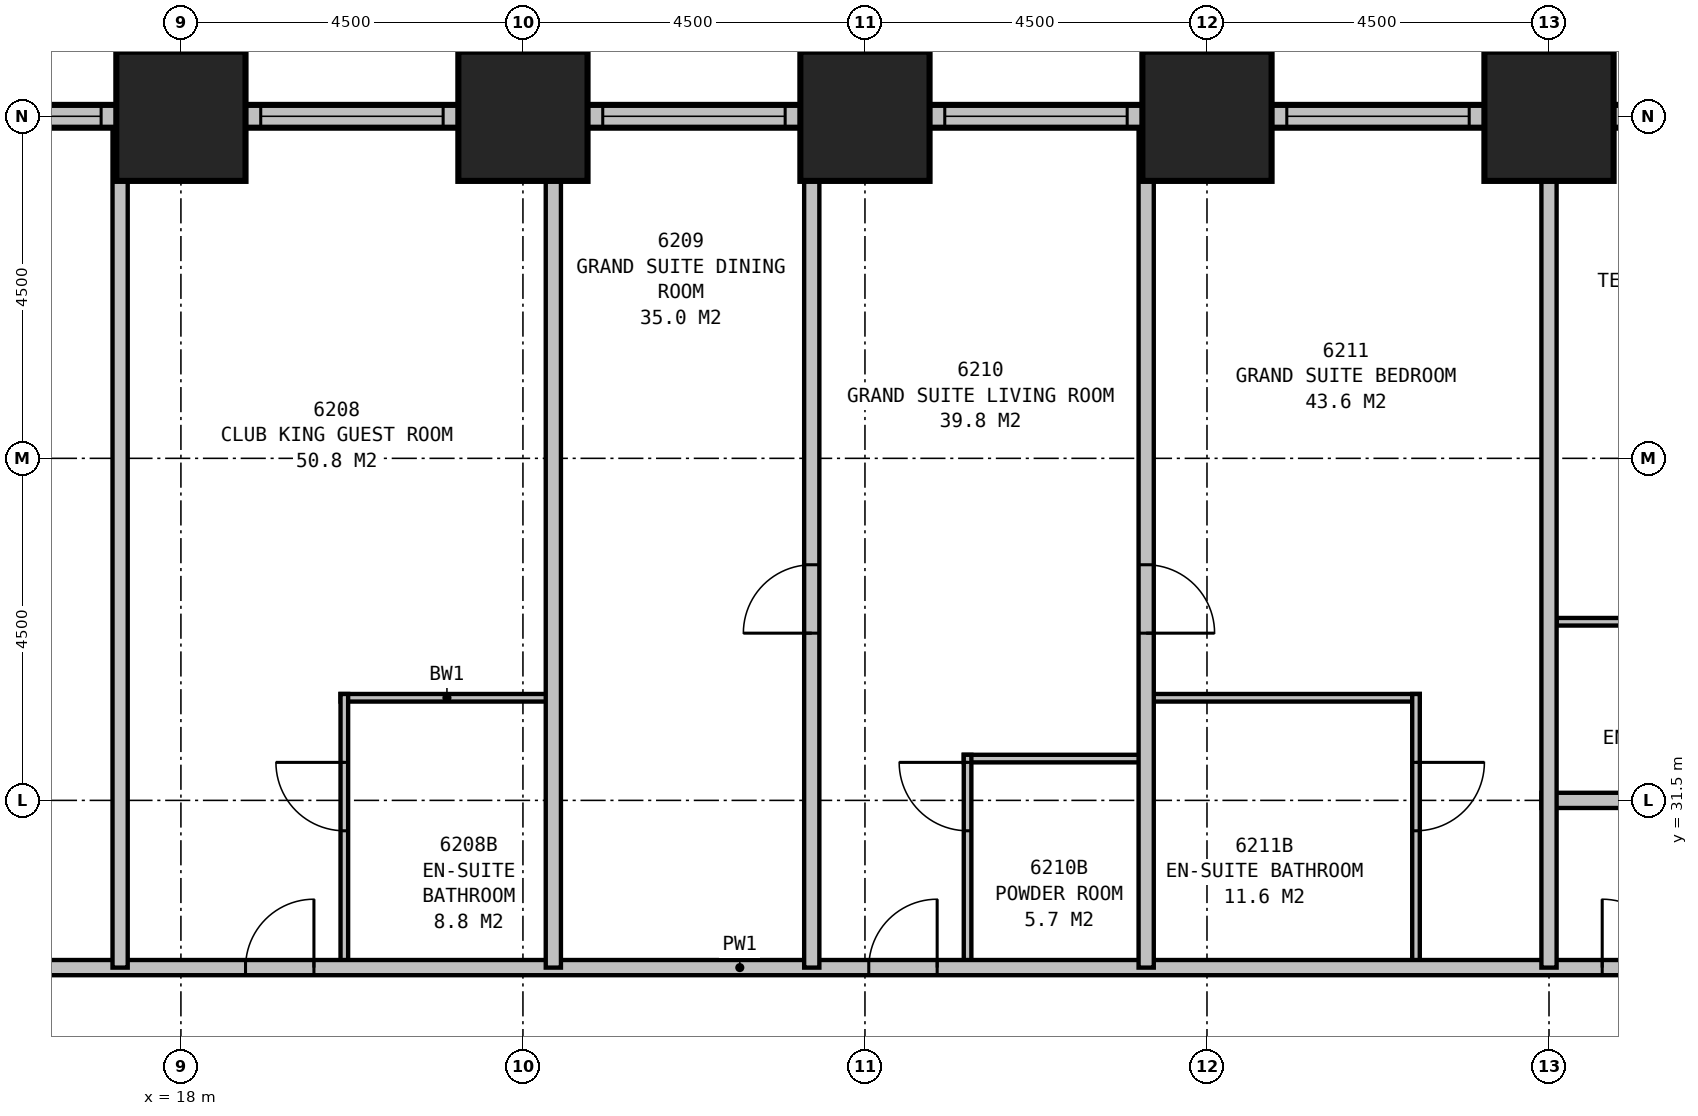
"""IFC4 building model, lengths in metres.
Left out: names, types, materials, properties, quantities, classifications, styles, units other than length and angle.
Written with IfcOpenShell. Run it as: python <this file> out.ifc"""

import sys

from ifc_helpers import new_model, si_unit, direction, frame, frame_2d, origin, origin_2d, place, context, subcontext, project, spatial, rectangle, extrude, element, fill, save


model = new_model("IFC4")
c1 = context("Model", 3, precision=1e-05, world=origin(), true_north=direction((0.0, 1.0)))
c2 = subcontext(c1, "Body", "Model", "MODEL_VIEW")
j1 = project(units=[si_unit("LENGTHUNIT", "METRE"), si_unit("PLANEANGLEUNIT", "RADIAN")], contexts=[c1])
p1 = place(None, origin())
s1 = spatial("IfcSite", under=j1, at=p1, CompositionType="ELEMENT")
p2 = place(p1, origin())
s2 = spatial("IfcBuilding", under=s1, at=p2, CompositionType="ELEMENT")
p3 = place(p2, frame((0.0, 0.0, 240.8)))
s3 = spatial("IfcBuildingStorey", under=s2, at=p3, CompositionType="ELEMENT", Elevation=240.8)
for number, where, z_axis, x_axis in (
    (1, (36.0, 40.5, 0.0), (0.0, 0.0, 1.0), (1.0, 0.0, 0.0)),
    (2, (31.5, 40.5, 0.0), (0.0, 0.0, 1.0), (1.0, 0.0, 0.0)),
    (3, (27.0, 40.5, 0.0), (0.0, 0.0, 1.0), (1.0, 0.0, 0.0)),
    (4, (22.5, 40.5, 0.0), (0.0, 0.0, 1.0), (1.0, 0.0, 0.0)),
    (5, (18.0, 40.5, 0.0), (0.0, 0.0, 1.0), (1.0, 0.0, 0.0)),
):
    element("IfcColumn", number, at=place(p3, frame(where, z_axis=z_axis, x_axis=x_axis)), inside=s3, PredefinedType="COLUMN", context=c2, shape_type="SweptSolid", body=[
        extrude(rectangle(XDim=1.7, YDim=1.7, at=origin_2d()), origin(), (0.0, 0.0, 1.0), 3.9),
    ])
p4 = place(p3, frame((40.65, 40.5, 0.0), z_axis=(0.0, 0.0, 1.0), x_axis=(-1.0, 0.0, 0.0)))
e6 = element("IfcWall", 6, at=p4, inside=s3, PredefinedType="STANDARD", context=c2, shape_type="SweptSolid", body=[
    extrude(rectangle(XDim=27.3, YDim=0.3, at=frame_2d((13.65, 0.0))), origin(), (0.0, 0.0, 1.0), 2.45),
])
p5 = place(p4, frame((1.2, 0.0, 0.5)))
e7 = element("IfcOpeningElement", 7, at=p5, cuts=e6, PredefinedType="OPENING", context=c2, shape_type="SweptSolid", body=[
    extrude(rectangle(XDim=2.4, YDim=1.75, at=frame_2d((1.2, 0.875))), frame((0.0, 0.16, 0.0), z_axis=(0.0, -1.0, 0.0), x_axis=(1.0, 0.0, 0.0)), (0.0, 0.0, 1.0), 0.32),
])
p6 = place(p4, frame((5.7, 0.0, 0.5)))
e8 = element("IfcOpeningElement", 8, at=p6, cuts=e6, PredefinedType="OPENING", context=c2, shape_type="SweptSolid", body=[
    extrude(rectangle(XDim=2.4, YDim=1.75, at=frame_2d((1.2, 0.875))), frame((0.0, 0.16, 0.0), z_axis=(0.0, -1.0, 0.0), x_axis=(1.0, 0.0, 0.0)), (0.0, 0.0, 1.0), 0.32),
])
p7 = place(p4, frame((10.2, 0.0, 0.5)))
e9 = element("IfcOpeningElement", 9, at=p7, cuts=e6, PredefinedType="OPENING", context=c2, shape_type="SweptSolid", body=[
    extrude(rectangle(XDim=2.4, YDim=1.75, at=frame_2d((1.2, 0.875))), frame((0.0, 0.16, 0.0), z_axis=(0.0, -1.0, 0.0), x_axis=(1.0, 0.0, 0.0)), (0.0, 0.0, 1.0), 0.32),
])
p8 = place(p4, frame((14.7, 0.0, 0.5)))
e10 = element("IfcOpeningElement", 10, at=p8, cuts=e6, PredefinedType="OPENING", context=c2, shape_type="SweptSolid", body=[
    extrude(rectangle(XDim=2.4, YDim=1.75, at=frame_2d((1.2, 0.875))), frame((0.0, 0.16, 0.0), z_axis=(0.0, -1.0, 0.0), x_axis=(1.0, 0.0, 0.0)), (0.0, 0.0, 1.0), 0.32),
])
p9 = place(p4, frame((19.2, 0.0, 0.5)))
e11 = element("IfcOpeningElement", 11, at=p9, cuts=e6, PredefinedType="OPENING", context=c2, shape_type="SweptSolid", body=[
    extrude(rectangle(XDim=2.4, YDim=1.75, at=frame_2d((1.2, 0.875))), frame((0.0, 0.16, 0.0), z_axis=(0.0, -1.0, 0.0), x_axis=(1.0, 0.0, 0.0)), (0.0, 0.0, 1.0), 0.32),
])
p10 = place(p4, frame((23.7, 0.0, 0.5)))
e12 = element("IfcOpeningElement", 12, at=p10, cuts=e6, PredefinedType="OPENING", context=c2, shape_type="SweptSolid", body=[
    extrude(rectangle(XDim=2.4, YDim=1.75, at=frame_2d((1.2, 0.875))), frame((0.0, 0.16, 0.0), z_axis=(0.0, -1.0, 0.0), x_axis=(1.0, 0.0, 0.0)), (0.0, 0.0, 1.0), 0.32),
])
p11 = place(p3, frame((12.406, 29.3, 0.0), z_axis=(0.0, 0.0, 1.0), x_axis=(1.0, 0.0, 0.0)))
e13 = element("IfcWall", 13, at=p11, inside=s3, PredefinedType="PARTITIONING", context=c2, shape_type="SweptSolid", body=[
    extrude(rectangle(XDim=25.894, YDim=0.2, at=frame_2d((12.947, 0.0))), origin(), (0.0, 0.0, 1.0), 3.65),
])
p12 = place(p11, frame((0.9, 0.0, 0.0)))
e14 = element("IfcOpeningElement", 14, at=p12, cuts=e13, PredefinedType="OPENING", context=c2, shape_type="SweptSolid", body=[
    extrude(rectangle(XDim=0.9, YDim=2.1, at=frame_2d((0.45, 1.05))), frame((0.0, 0.11, 0.0), z_axis=(0.0, -1.0, 0.0), x_axis=(1.0, 0.0, 0.0)), (0.0, 0.0, 1.0), 0.22),
])
p13 = place(p11, frame((6.444, 0.0, 0.0)))
e15 = element("IfcOpeningElement", 15, at=p13, cuts=e13, PredefinedType="OPENING", context=c2, shape_type="SweptSolid", body=[
    extrude(rectangle(XDim=0.9, YDim=2.1, at=frame_2d((0.45, 1.05))), frame((0.0, 0.11, 0.0), z_axis=(0.0, -1.0, 0.0), x_axis=(1.0, 0.0, 0.0)), (0.0, 0.0, 1.0), 0.22),
])
p14 = place(p11, frame((14.644, 0.0, 0.0)))
e16 = element("IfcOpeningElement", 16, at=p14, cuts=e13, PredefinedType="OPENING", context=c2, shape_type="SweptSolid", body=[
    extrude(rectangle(XDim=0.9, YDim=2.1, at=frame_2d((0.45, 1.05))), frame((0.0, 0.11, 0.0), z_axis=(0.0, -1.0, 0.0), x_axis=(1.0, 0.0, 0.0)), (0.0, 0.0, 1.0), 0.22),
])
p15 = place(p11, frame((24.293, 0.0, 0.0)))
e17 = element("IfcOpeningElement", 17, at=p15, cuts=e13, PredefinedType="OPENING", context=c2, shape_type="SweptSolid", body=[
    extrude(rectangle(XDim=0.9, YDim=2.1, at=frame_2d((0.45, 1.05))), frame((0.0, 0.11, 0.0), z_axis=(0.0, -1.0, 0.0), x_axis=(1.0, 0.0, 0.0)), (0.0, 0.0, 1.0), 0.22),
])
for number, where, z_axis, x_axis in (
    (18, (17.2, 29.3, 0.0), (0.0, 0.0, 1.0), (0.0, 1.0, 0.0)),
    (19, (22.9, 29.3, 0.0), (0.0, 0.0, 1.0), (0.0, 1.0, 0.0)),
):
    element("IfcWall", number, at=place(p3, frame(where, z_axis=z_axis, x_axis=x_axis)), inside=s3, PredefinedType="PARTITIONING", context=c2, shape_type="SweptSolid", body=[
        extrude(rectangle(XDim=11.2, YDim=0.2, at=frame_2d((5.6, 0.0))), origin(), (0.0, 0.0, 1.0), 2.6),
    ])
p16 = place(p3, frame((26.3, 29.3, 0.0), z_axis=(0.0, 0.0, 1.0), x_axis=(0.0, 1.0, 0.0)))
e20 = element("IfcWall", 20, at=p16, inside=s3, PredefinedType="PARTITIONING", context=c2, shape_type="SweptSolid", body=[
    extrude(rectangle(XDim=11.2, YDim=0.2, at=frame_2d((5.6, 0.0))), origin(), (0.0, 0.0, 1.0), 2.6),
])
p17 = place(p16, frame((4.4, 0.0, 0.0)))
e21 = element("IfcOpeningElement", 21, at=p17, cuts=e20, PredefinedType="OPENING", context=c2, shape_type="SweptSolid", body=[
    extrude(rectangle(XDim=0.9, YDim=2.1, at=frame_2d((0.45, 1.05))), frame((0.0, 0.11, 0.0), z_axis=(0.0, -1.0, 0.0), x_axis=(1.0, 0.0, 0.0)), (0.0, 0.0, 1.0), 0.22),
])
p18 = place(p3, frame((30.7, 29.3, 0.0), z_axis=(0.0, 0.0, 1.0), x_axis=(0.0, 1.0, 0.0)))
e22 = element("IfcWall", 22, at=p18, inside=s3, PredefinedType="PARTITIONING", context=c2, shape_type="SweptSolid", body=[
    extrude(rectangle(XDim=11.2, YDim=0.2, at=frame_2d((5.6, 0.0))), origin(), (0.0, 0.0, 1.0), 2.6),
])
p19 = place(p18, frame((5.3, 0.0, 0.0), z_axis=(0.0, 0.0, 1.0), x_axis=(-1.0, 0.0, 0.0)))
e23 = element("IfcOpeningElement", 23, at=p19, cuts=e22, PredefinedType="OPENING", context=c2, shape_type="SweptSolid", body=[
    extrude(rectangle(XDim=0.9, YDim=2.1, at=frame_2d((0.45, 1.05))), frame((0.0, 0.11, 0.0), z_axis=(0.0, -1.0, 0.0), x_axis=(1.0, 0.0, 0.0)), (0.0, 0.0, 1.0), 0.22),
])
p20 = place(p3, frame((20.1, 32.85, 0.0), z_axis=(0.0, 0.0, 1.0), x_axis=(1.0, 0.0, 0.0)))
e24 = element("IfcWall", 24, at=p20, inside=s3, PredefinedType="PLUMBINGWALL", context=c2, shape_type="SweptSolid", body=[
    extrude(rectangle(XDim=2.8, YDim=0.1, at=frame_2d((1.4, 0.0))), origin(), (0.0, 0.0, 1.0), 3.65),
])
p21 = place(p3, frame((20.15, 29.3, 0.0), z_axis=(0.0, 0.0, 1.0), x_axis=(0.0, 1.0, 0.0)))
e25 = element("IfcWall", 25, at=p21, inside=s3, PredefinedType="PLUMBINGWALL", context=c2, shape_type="SweptSolid", body=[
    extrude(rectangle(XDim=3.6, YDim=0.1, at=frame_2d((1.8, 0.0))), origin(), (0.0, 0.0, 1.0), 3.65),
])
p22 = place(p21, frame((1.8, 0.0, 0.0)))
e26 = element("IfcOpeningElement", 26, at=p22, cuts=e25, PredefinedType="OPENING", context=c2, shape_type="SweptSolid", body=[
    extrude(rectangle(XDim=0.9, YDim=2.1, at=frame_2d((0.45, 1.05))), frame((0.0, 0.06, 0.0), z_axis=(0.0, -1.0, 0.0), x_axis=(1.0, 0.0, 0.0)), (0.0, 0.0, 1.0), 0.12),
])
p23 = place(p3, frame((28.3, 32.05, 0.0), z_axis=(0.0, 0.0, 1.0), x_axis=(1.0, 0.0, 0.0)))
e27 = element("IfcWall", 27, at=p23, inside=s3, PredefinedType="PLUMBINGWALL", context=c2, shape_type="SweptSolid", body=[
    extrude(rectangle(XDim=2.4, YDim=0.1, at=frame_2d((1.2, 0.0))), origin(), (0.0, 0.0, 1.0), 3.65),
])
p24 = place(p3, frame((28.35, 29.3, 0.0), z_axis=(0.0, 0.0, 1.0), x_axis=(0.0, 1.0, 0.0)))
e28 = element("IfcWall", 28, at=p24, inside=s3, PredefinedType="PLUMBINGWALL", context=c2, shape_type="SweptSolid", body=[
    extrude(rectangle(XDim=2.8, YDim=0.1, at=frame_2d((1.4, 0.0))), origin(), (0.0, 0.0, 1.0), 3.65),
])
p25 = place(p24, frame((1.8, 0.0, 0.0)))
e29 = element("IfcOpeningElement", 29, at=p25, cuts=e28, PredefinedType="OPENING", context=c2, shape_type="SweptSolid", body=[
    extrude(rectangle(XDim=0.9, YDim=2.1, at=frame_2d((0.45, 1.05))), frame((0.0, 0.06, 0.0), z_axis=(0.0, -1.0, 0.0), x_axis=(1.0, 0.0, 0.0)), (0.0, 0.0, 1.0), 0.12),
])
p26 = place(p3, frame((30.7, 32.85, 0.0), z_axis=(0.0, 0.0, 1.0), x_axis=(1.0, 0.0, 0.0)))
e30 = element("IfcWall", 30, at=p26, inside=s3, PredefinedType="PLUMBINGWALL", context=c2, shape_type="SweptSolid", body=[
    extrude(rectangle(XDim=3.6, YDim=0.1, at=frame_2d((1.8, 0.0))), origin(), (0.0, 0.0, 1.0), 3.65),
])
p27 = place(p3, frame((34.25, 29.3, 0.0), z_axis=(0.0, 0.0, 1.0), x_axis=(0.0, 1.0, 0.0)))
e31 = element("IfcWall", 31, at=p27, inside=s3, PredefinedType="PLUMBINGWALL", context=c2, shape_type="SweptSolid", body=[
    extrude(rectangle(XDim=3.6, YDim=0.1, at=frame_2d((1.8, 0.0))), origin(), (0.0, 0.0, 1.0), 3.65),
])
p28 = place(p27, frame((2.7, 0.0, 0.0), z_axis=(0.0, 0.0, 1.0), x_axis=(-1.0, 0.0, 0.0)))
e32 = element("IfcOpeningElement", 32, at=p28, cuts=e31, PredefinedType="OPENING", context=c2, shape_type="SweptSolid", body=[
    extrude(rectangle(XDim=0.9, YDim=2.1, at=frame_2d((0.45, 1.05))), frame((0.0, 0.06, 0.0), z_axis=(0.0, -1.0, 0.0), x_axis=(1.0, 0.0, 0.0)), (0.0, 0.0, 1.0), 0.12),
])
p29 = place(p3, frame((36.0, 29.3, 0.0), z_axis=(0.0, 0.0, 1.0), x_axis=(0.0, 1.0, 0.0)))
e33 = element("IfcWall", 33, at=p29, inside=s3, PredefinedType="PARTITIONING", context=c2, shape_type="SweptSolid", body=[
    extrude(rectangle(XDim=11.2, YDim=0.2, at=frame_2d((5.6, 0.0))), origin(), (0.0, 0.0, 1.0), 2.6),
])
p30 = place(p3, frame((35.9, 31.5, 0.0), z_axis=(0.0, 0.0, 1.0), x_axis=(1.0, 0.0, 0.0)))
e34 = element("IfcWall", 34, at=p30, inside=s3, PredefinedType="PARTITIONING", context=c2, shape_type="SweptSolid", body=[
    extrude(rectangle(XDim=10.099, YDim=0.2, at=frame_2d((5.05, 0.0))), origin(), (0.0, 0.0, 1.0), 3.65),
])
p31 = place(p30, frame((8.099, 0.0, 0.0)))
e35 = element("IfcOpeningElement", 35, at=p31, cuts=e34, PredefinedType="OPENING", context=c2, shape_type="SweptSolid", body=[
    extrude(rectangle(XDim=0.9, YDim=2.1, at=frame_2d((0.45, 1.05))), frame((0.0, 0.11, 0.0), z_axis=(0.0, -1.0, 0.0), x_axis=(1.0, 0.0, 0.0)), (0.0, 0.0, 1.0), 0.22),
])
p32 = place(p3, frame((36.1, 33.85, 0.0), z_axis=(0.0, 0.0, 1.0), x_axis=(1.0, 0.0, 0.0)))
e36 = element("IfcWall", 36, at=p32, inside=s3, PredefinedType="PLUMBINGWALL", context=c2, shape_type="SweptSolid", body=[
    extrude(rectangle(XDim=3.5, YDim=0.1, at=frame_2d((1.75, 0.0))), origin(), (0.0, 0.0, 1.0), 3.65),
])
p33 = place(p32, frame((0.9, 0.0, 0.0)))
e37 = element("IfcOpeningElement", 37, at=p33, cuts=e36, PredefinedType="OPENING", context=c2, shape_type="SweptSolid", body=[
    extrude(rectangle(XDim=0.9, YDim=2.1, at=frame_2d((0.45, 1.05))), frame((0.0, 0.06, 0.0), z_axis=(0.0, -1.0, 0.0), x_axis=(1.0, 0.0, 0.0)), (0.0, 0.0, 1.0), 0.12),
])
p34 = place(p6, origin())
e38 = element("IfcWindow", 38, at=p34, inside=s3, PartitioningType="SINGLE_PANEL", PredefinedType="WINDOW", context=c2, shape_type="SweptSolid", body=[
    extrude(rectangle(XDim=2.4, YDim=1.75, at=frame_2d((1.2, 0.875))), frame((0.0, 0.03, 0.0), z_axis=(0.0, -1.0, 0.0), x_axis=(1.0, 0.0, 0.0)), (0.0, 0.0, 1.0), 0.06),
])
fill(e8, e38)
p35 = place(p7, origin())
e39 = element("IfcWindow", 39, at=p35, inside=s3, PartitioningType="SINGLE_PANEL", PredefinedType="WINDOW", context=c2, shape_type="SweptSolid", body=[
    extrude(rectangle(XDim=2.4, YDim=1.75, at=frame_2d((1.2, 0.875))), frame((0.0, 0.03, 0.0), z_axis=(0.0, -1.0, 0.0), x_axis=(1.0, 0.0, 0.0)), (0.0, 0.0, 1.0), 0.06),
])
fill(e9, e39)
p36 = place(p8, origin())
e40 = element("IfcWindow", 40, at=p36, inside=s3, PartitioningType="SINGLE_PANEL", PredefinedType="WINDOW", context=c2, shape_type="SweptSolid", body=[
    extrude(rectangle(XDim=2.4, YDim=1.75, at=frame_2d((1.2, 0.875))), frame((0.0, 0.03, 0.0), z_axis=(0.0, -1.0, 0.0), x_axis=(1.0, 0.0, 0.0)), (0.0, 0.0, 1.0), 0.06),
])
fill(e10, e40)
p37 = place(p9, origin())
e41 = element("IfcWindow", 41, at=p37, inside=s3, PartitioningType="SINGLE_PANEL", PredefinedType="WINDOW", context=c2, shape_type="SweptSolid", body=[
    extrude(rectangle(XDim=2.4, YDim=1.75, at=frame_2d((1.2, 0.875))), frame((0.0, 0.03, 0.0), z_axis=(0.0, -1.0, 0.0), x_axis=(1.0, 0.0, 0.0)), (0.0, 0.0, 1.0), 0.06),
])
fill(e11, e41)
p38 = place(p10, origin())
e42 = element("IfcWindow", 42, at=p38, inside=s3, PartitioningType="SINGLE_PANEL", PredefinedType="WINDOW", context=c2, shape_type="SweptSolid", body=[
    extrude(rectangle(XDim=2.4, YDim=1.75, at=frame_2d((1.2, 0.875))), frame((0.0, 0.03, 0.0), z_axis=(0.0, -1.0, 0.0), x_axis=(1.0, 0.0, 0.0)), (0.0, 0.0, 1.0), 0.06),
])
fill(e12, e42)
p39 = place(p13, origin())
e43 = element("IfcDoor", 43, at=p39, inside=s3, OperationType="SINGLE_SWING_RIGHT", PredefinedType="DOOR", context=c2, shape_type="SweptSolid", body=[
    extrude(rectangle(XDim=0.9, YDim=2.1, at=frame_2d((0.45, 1.05))), frame((0.0, 0.025, 0.0), z_axis=(0.0, -1.0, 0.0), x_axis=(1.0, 0.0, 0.0)), (0.0, 0.0, 1.0), 0.05),
])
fill(e15, e43)
p40 = place(p14, origin())
e44 = element("IfcDoor", 44, at=p40, inside=s3, OperationType="SINGLE_SWING_RIGHT", PredefinedType="DOOR", context=c2, shape_type="SweptSolid", body=[
    extrude(rectangle(XDim=0.9, YDim=2.1, at=frame_2d((0.45, 1.05))), frame((0.0, 0.025, 0.0), z_axis=(0.0, -1.0, 0.0), x_axis=(1.0, 0.0, 0.0)), (0.0, 0.0, 1.0), 0.05),
])
fill(e16, e44)
p41 = place(p15, origin())
e45 = element("IfcDoor", 45, at=p41, inside=s3, OperationType="SINGLE_SWING_LEFT", PredefinedType="DOOR", context=c2, shape_type="SweptSolid", body=[
    extrude(rectangle(XDim=0.9, YDim=2.1, at=frame_2d((0.45, 1.05))), frame((0.0, 0.025, 0.0), z_axis=(0.0, -1.0, 0.0), x_axis=(1.0, 0.0, 0.0)), (0.0, 0.0, 1.0), 0.05),
])
fill(e17, e45)
p42 = place(p17, origin())
e46 = element("IfcDoor", 46, at=p42, inside=s3, OperationType="SINGLE_SWING_LEFT", PredefinedType="DOOR", context=c2, shape_type="SweptSolid", body=[
    extrude(rectangle(XDim=0.9, YDim=2.1, at=frame_2d((0.45, 1.05))), frame((0.0, 0.025, 0.0), z_axis=(0.0, -1.0, 0.0), x_axis=(1.0, 0.0, 0.0)), (0.0, 0.0, 1.0), 0.05),
])
fill(e21, e46)
p43 = place(p19, origin())
e47 = element("IfcDoor", 47, at=p43, inside=s3, OperationType="SINGLE_SWING_RIGHT", PredefinedType="DOOR", context=c2, shape_type="SweptSolid", body=[
    extrude(rectangle(XDim=0.9, YDim=2.1, at=frame_2d((0.45, 1.05))), frame((0.0, 0.025, 0.0), z_axis=(0.0, -1.0, 0.0), x_axis=(1.0, 0.0, 0.0)), (0.0, 0.0, 1.0), 0.05),
])
fill(e23, e47)
p44 = place(p22, origin())
e48 = element("IfcDoor", 48, at=p44, inside=s3, OperationType="SINGLE_SWING_RIGHT", PredefinedType="DOOR", context=c2, shape_type="SweptSolid", body=[
    extrude(rectangle(XDim=0.9, YDim=2.1, at=frame_2d((0.45, 1.05))), frame((0.0, 0.025, 0.0), z_axis=(0.0, -1.0, 0.0), x_axis=(1.0, 0.0, 0.0)), (0.0, 0.0, 1.0), 0.05),
])
fill(e26, e48)
p45 = place(p25, origin())
e49 = element("IfcDoor", 49, at=p45, inside=s3, OperationType="SINGLE_SWING_RIGHT", PredefinedType="DOOR", context=c2, shape_type="SweptSolid", body=[
    extrude(rectangle(XDim=0.9, YDim=2.1, at=frame_2d((0.45, 1.05))), frame((0.0, 0.025, 0.0), z_axis=(0.0, -1.0, 0.0), x_axis=(1.0, 0.0, 0.0)), (0.0, 0.0, 1.0), 0.05),
])
fill(e29, e49)
p46 = place(p28, origin())
e50 = element("IfcDoor", 50, at=p46, inside=s3, OperationType="SINGLE_SWING_LEFT", PredefinedType="DOOR", context=c2, shape_type="SweptSolid", body=[
    extrude(rectangle(XDim=0.9, YDim=2.1, at=frame_2d((0.45, 1.05))), frame((0.0, 0.025, 0.0), z_axis=(0.0, -1.0, 0.0), x_axis=(1.0, 0.0, 0.0)), (0.0, 0.0, 1.0), 0.05),
])
fill(e32, e50)
save(model, sys.argv[1])
